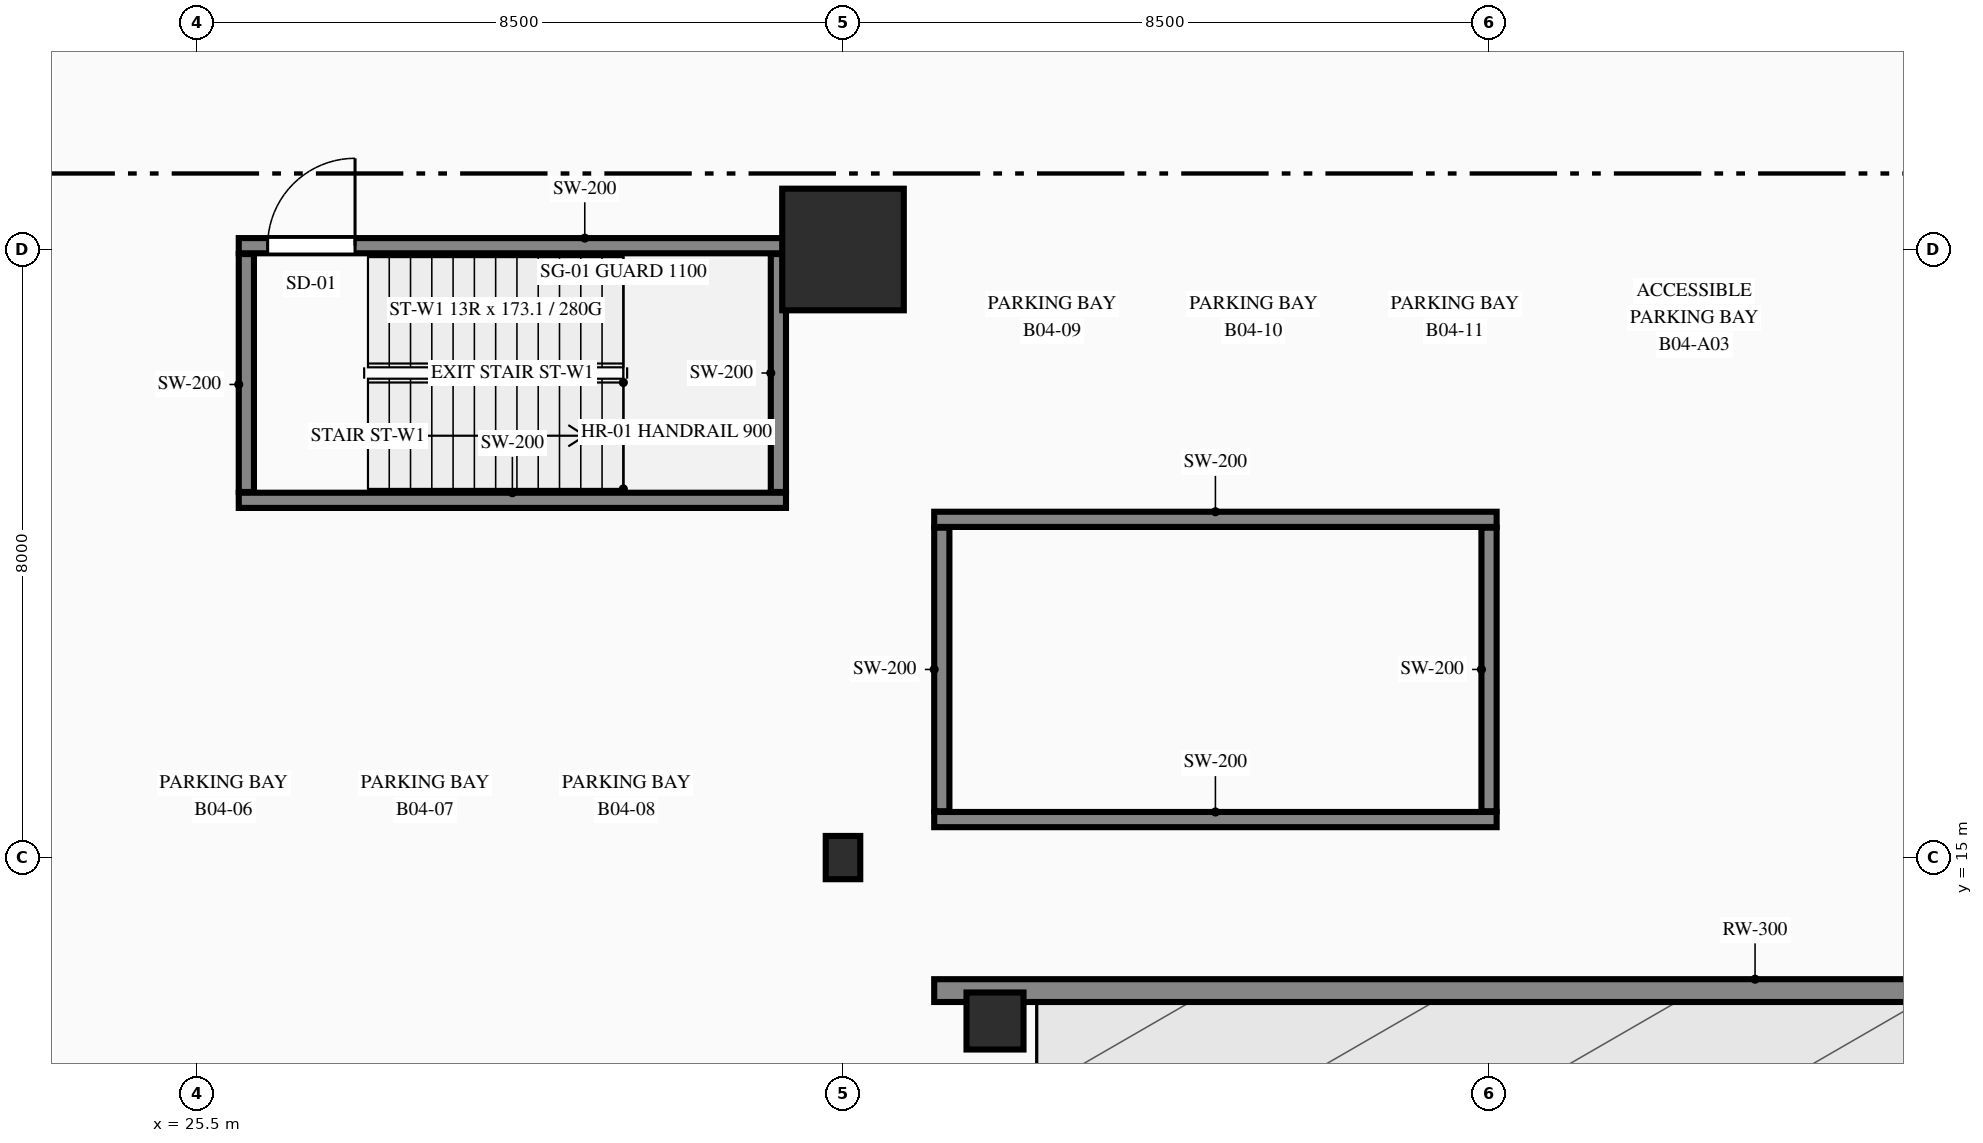
"""IFC4 building model, lengths in metres.
Left out: names, types, materials, properties, quantities, classifications, styles, units other than length and angle.
Written with IfcOpenShell. Run it as: python <this file> out.ifc"""

import sys

from ifc_helpers import new_model, si_unit, direction, frame, frame_2d, origin, origin_2d, place, context, subcontext, project, spatial, rectangle, i_section, extrude, element, fill, save


model = new_model("IFC4")
c1 = context("Model", 3, precision=1e-05, world=origin(), true_north=direction((0.0, 1.0)))
c2 = subcontext(c1, "Body", "Model", "MODEL_VIEW")
j1 = project(units=[si_unit("LENGTHUNIT", "METRE"), si_unit("PLANEANGLEUNIT", "RADIAN")], contexts=[c1])
p1 = place(None, origin())
s1 = spatial("IfcSite", under=j1, at=p1, CompositionType="ELEMENT")
p2 = place(p1, origin())
s2 = spatial("IfcBuilding", under=s1, at=p2, CompositionType="ELEMENT")
p3 = place(p2, frame((0.0, 0.0, -18.0)))
s3 = spatial("IfcBuildingStorey", under=s2, at=p3, CompositionType="ELEMENT", Elevation=-18.0)
p4 = place(p3, frame((26.05, 19.7, 0.0), z_axis=(0.0, 0.0, 1.0), x_axis=(1.0, 0.0, 0.0)))
e1 = element("IfcWall", 1, at=p4, inside=s3, PredefinedType="SHEAR", context=c2, shape_type="SweptSolid", body=[
    extrude(rectangle(XDim=7.2, YDim=0.2, at=frame_2d((3.6, 0.0))), origin(), (0.0, 0.0, 1.0), 4.5),
])
p5 = place(p3, frame((26.05, 23.05, 0.0), z_axis=(0.0, 0.0, 1.0), x_axis=(1.0, 0.0, 0.0)))
e2 = element("IfcWall", 2, at=p5, inside=s3, PredefinedType="SHEAR", context=c2, shape_type="SweptSolid", body=[
    extrude(rectangle(XDim=7.2, YDim=0.2, at=frame_2d((3.6, 0.0))), origin(), (0.0, 0.0, 1.0), 4.5),
])
p6 = place(p5, frame((0.38, 0.0, 0.0)))
e3 = element("IfcOpeningElement", 3, at=p6, cuts=e2, PredefinedType="OPENING", context=c2, shape_type="SweptSolid", body=[
    extrude(rectangle(XDim=1.15, YDim=2.2, at=frame_2d((0.575, 1.1))), frame((0.0, 0.11, 0.0), z_axis=(0.0, -1.0, 0.0), x_axis=(1.0, 0.0, 0.0)), (0.0, 0.0, 1.0), 0.22),
])
for number, where, z_axis, x_axis in (
    (4, (26.15, 19.81, 0.0), (0.0, 0.0, 1.0), (0.0, 1.0, 0.0)),
    (5, (33.15, 19.81, 0.0), (0.0, 0.0, 1.0), (0.0, 1.0, 0.0)),
):
    element("IfcWall", number, at=place(p3, frame(where, z_axis=z_axis, x_axis=x_axis)), inside=s3, PredefinedType="SHEAR", context=c2, shape_type="SweptSolid", body=[
        extrude(rectangle(XDim=3.13, YDim=0.2, at=frame_2d((1.565, 0.0))), origin(), (0.0, 0.0, 1.0), 4.5),
    ])
for number, where, z_axis, x_axis in (
    (6, (35.2, 15.5, 0.0), (0.0, 0.0, 1.0), (1.0, 0.0, 0.0)),
    (7, (35.2, 19.45, 0.0), (0.0, 0.0, 1.0), (1.0, 0.0, 0.0)),
):
    element("IfcWall", number, at=place(p3, frame(where, z_axis=z_axis, x_axis=x_axis)), inside=s3, PredefinedType="SHEAR", context=c2, shape_type="SweptSolid", body=[
        extrude(rectangle(XDim=7.4, YDim=0.2, at=frame_2d((3.7, 0.0))), origin(), (0.0, 0.0, 1.0), 4.5),
    ])
for number, where, z_axis, x_axis in (
    (8, (35.3, 15.61, 0.0), (0.0, 0.0, 1.0), (0.0, 1.0, 0.0)),
    (9, (42.5, 15.61, 0.0), (0.0, 0.0, 1.0), (0.0, 1.0, 0.0)),
):
    element("IfcWall", number, at=place(p3, frame(where, z_axis=z_axis, x_axis=x_axis)), inside=s3, PredefinedType="SHEAR", context=c2, shape_type="SweptSolid", body=[
        extrude(rectangle(XDim=3.73, YDim=0.2, at=frame_2d((1.865, 0.0))), origin(), (0.0, 0.0, 1.0), 4.5),
    ])
p7 = place(p3, frame((34.0, 15.0, 0.0), z_axis=(0.0, 0.0, 1.0), x_axis=(1.0, 0.0, 0.0)))
e10 = element("IfcColumn", 10, at=p7, inside=s3, PredefinedType="COLUMN", context=c2, shape_type="SweptSolid", body=[
    extrude(i_section(OverallWidth=0.454, OverallDepth=0.569, WebThickness=0.078, FlangeThickness=0.08, FilletRadius=0.015, at=origin_2d()), origin(), (0.0, 0.0, 1.0), 4.5),
])
p8 = place(p3, frame((34.0, 23.0, 0.0), z_axis=(0.0, 0.0, 1.0), x_axis=(1.0, 0.0, 0.0)))
e11 = element("IfcColumn", 11, at=p8, inside=s3, PredefinedType="COLUMN", context=c2, shape_type="SweptSolid", body=[
    extrude(rectangle(XDim=1.6, YDim=1.6, at=origin_2d()), origin(), (0.0, 0.0, 1.0), 4.5),
])
p9 = place(p3, frame((36.0, 12.85, 0.0), z_axis=(0.0, 0.0, 1.0), x_axis=(1.0, 0.0, 0.0)))
e12 = element("IfcColumn", 12, at=p9, inside=s3, PredefinedType="COLUMN", context=c2, shape_type="SweptSolid", body=[
    extrude(rectangle(XDim=0.75, YDim=0.75, at=origin_2d()), origin(), (0.0, 0.0, 1.0), 4.2),
])
p10 = place(p3, frame((35.2, 13.25, 0.0), z_axis=(0.0, 0.0, 1.0), x_axis=(1.0, 0.0, 0.0)))
e13 = element("IfcWall", 13, at=p10, inside=s3, PredefinedType="SOLIDWALL", context=c2, shape_type="SweptSolid", body=[
    extrude(rectangle(XDim=21.6, YDim=0.3, at=frame_2d((10.8, 0.0))), origin(), (0.0, 0.0, 1.0), 4.5),
])
p11 = place(p6, origin())
e14 = element("IfcDoor", 14, at=p11, inside=s3, OperationType="SINGLE_SWING_RIGHT", PredefinedType="DOOR", context=c2, shape_type="SweptSolid", body=[
    extrude(rectangle(XDim=1.15, YDim=2.2, at=frame_2d((0.575, 1.1))), frame((0.0, 0.025, 0.0), z_axis=(0.0, -1.0, 0.0), x_axis=(1.0, 0.0, 0.0)), (0.0, 0.0, 1.0), 0.05),
])
fill(e3, e14)
save(model, sys.argv[1])
